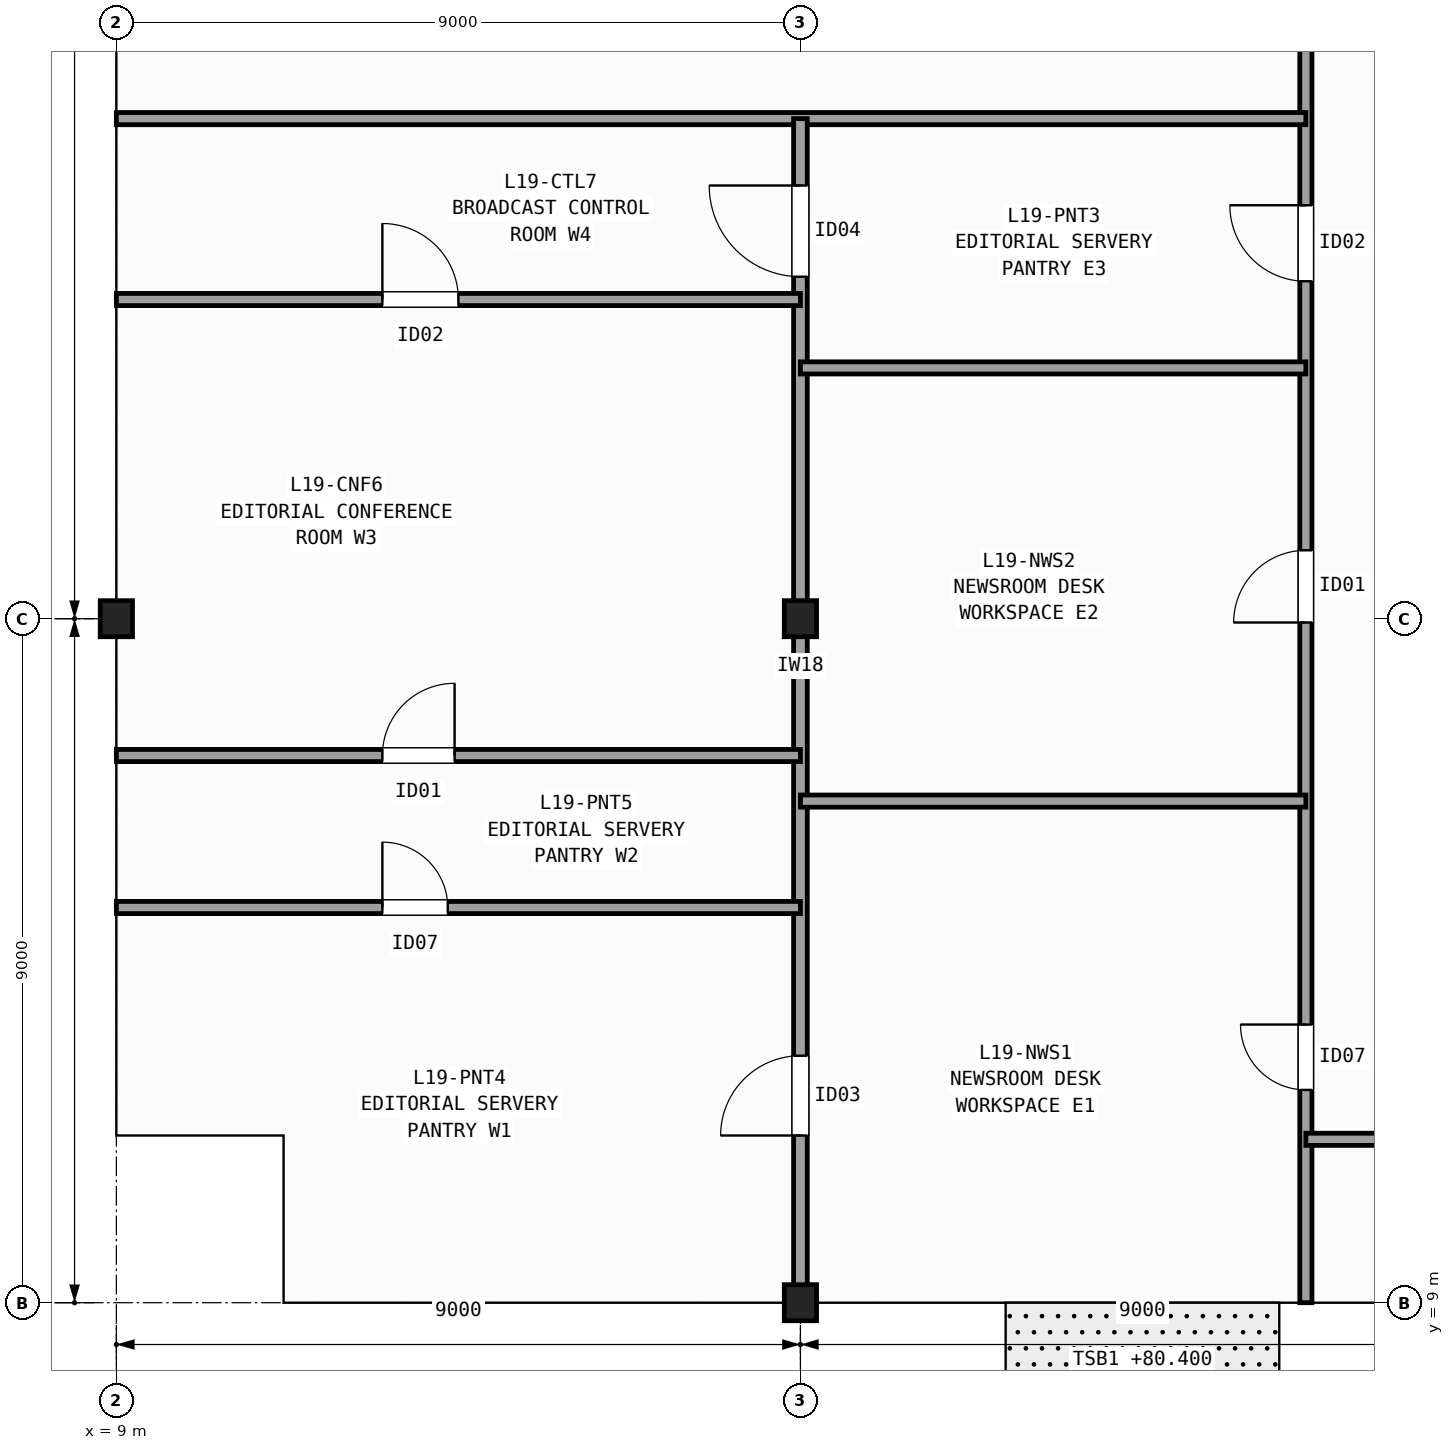
"""IFC4 building model, lengths in metres.
Left out: names, types, materials, properties, quantities, classifications, styles, units other than length and angle.
Written with IfcOpenShell. Run it as: python <this file> out.ifc"""

import sys

from ifc_helpers import new_model, si_unit, direction, frame, frame_2d, origin, origin_2d, place, context, subcontext, project, spatial, rectangle, i_section, extrude, element, fill, save


model = new_model("IFC4")
c1 = context("Model", 3, precision=1e-05, world=origin(), true_north=direction((0.0, 1.0)))
c2 = subcontext(c1, "Body", "Model", "MODEL_VIEW")
j1 = project(units=[si_unit("LENGTHUNIT", "METRE"), si_unit("PLANEANGLEUNIT", "RADIAN")], contexts=[c1])
p1 = place(None, origin())
s1 = spatial("IfcSite", under=j1, at=p1, CompositionType="ELEMENT")
p2 = place(p1, origin())
s2 = spatial("IfcBuilding", under=s1, at=p2, CompositionType="ELEMENT")
p3 = place(p2, frame((0.0, 0.0, 80.4)))
s3 = spatial("IfcBuildingStorey", under=s2, at=p3, CompositionType="ELEMENT", Elevation=80.4)
for number, where, z_axis, x_axis in (
    (1, (9.0, 18.0, 0.0), (0.0, 0.0, 1.0), (1.0, 0.0, 0.0)),
    (2, (18.0, 9.0, 0.0), (0.0, 0.0, 1.0), (1.0, 0.0, 0.0)),
    (3, (18.0, 18.0, 0.0), (0.0, 0.0, 1.0), (1.0, 0.0, 0.0)),
):
    element("IfcColumn", number, at=place(p3, frame(where, z_axis=z_axis, x_axis=x_axis)), inside=s3, PredefinedType="COLUMN", context=c2, shape_type="SweptSolid", body=[
        extrude(i_section(OverallWidth=0.424, OverallDepth=0.474, WebThickness=0.048, FlangeThickness=0.077, FilletRadius=0.015, at=origin_2d()), origin(), (0.0, 0.0, 1.0), 3.7),
    ])
p4 = place(p3, frame((24.65, 9.0, 0.0), z_axis=(0.0, 0.0, 1.0), x_axis=(0.0, 1.0, 0.0)))
e4 = element("IfcWall", 4, at=p4, inside=s3, PredefinedType="PARTITIONING", context=c2, shape_type="SweptSolid", body=[
    extrude(rectangle(XDim=19.2, YDim=0.16, at=frame_2d((9.6, 0.0))), origin(), (0.0, 0.0, 1.0), 2.577),
])
p5 = place(p4, frame((2.8, 0.0, 0.0)))
e5 = element("IfcOpeningElement", 5, at=p5, cuts=e4, PredefinedType="OPENING", context=c2, shape_type="SweptSolid", body=[
    extrude(rectangle(XDim=0.86, YDim=2.05, at=frame_2d((0.43, 1.025))), frame((0.0, 0.09, 0.0), z_axis=(0.0, -1.0, 0.0), x_axis=(1.0, 0.0, 0.0)), (0.0, 0.0, 1.0), 0.18),
])
p6 = place(p4, frame((8.95, 0.0, 0.0)))
e6 = element("IfcOpeningElement", 6, at=p6, cuts=e4, PredefinedType="OPENING", context=c2, shape_type="SweptSolid", body=[
    extrude(rectangle(XDim=0.95, YDim=2.1, at=frame_2d((0.475, 1.05))), frame((0.0, 0.09, 0.0), z_axis=(0.0, -1.0, 0.0), x_axis=(1.0, 0.0, 0.0)), (0.0, 0.0, 1.0), 0.18),
])
p7 = place(p4, frame((13.44, 0.0, 0.0)))
e7 = element("IfcOpeningElement", 7, at=p7, cuts=e4, PredefinedType="OPENING", context=c2, shape_type="SweptSolid", body=[
    extrude(rectangle(XDim=1.0, YDim=2.1, at=frame_2d((0.5, 1.05))), frame((0.0, 0.09, 0.0), z_axis=(0.0, -1.0, 0.0), x_axis=(1.0, 0.0, 0.0)), (0.0, 0.0, 1.0), 0.18),
])
p8 = place(p3, frame((9.0, 24.58, 0.0), z_axis=(0.0, 0.0, 1.0), x_axis=(1.0, 0.0, 0.0)))
e8 = element("IfcWall", 8, at=p8, inside=s3, PredefinedType="PARTITIONING", context=c2, shape_type="SweptSolid", body=[
    extrude(rectangle(XDim=15.65, YDim=0.16, at=frame_2d((7.825, 0.0))), origin(), (0.0, 0.0, 1.0), 2.577),
])
p9 = place(p3, frame((18.0, 9.0, 0.0), z_axis=(0.0, 0.0, 1.0), x_axis=(0.0, 1.0, 0.0)))
e9 = element("IfcWall", 9, at=p9, inside=s3, PredefinedType="PARTITIONING", context=c2, shape_type="SweptSolid", body=[
    extrude(rectangle(XDim=15.58, YDim=0.18, at=frame_2d((7.79, 0.0))), origin(), (0.0, 0.0, 1.0), 2.577),
])
p10 = place(p9, frame((2.2, 0.0, 0.0)))
e10 = element("IfcOpeningElement", 10, at=p10, cuts=e9, PredefinedType="OPENING", context=c2, shape_type="SweptSolid", body=[
    extrude(rectangle(XDim=1.05, YDim=2.15, at=frame_2d((0.525, 1.075))), frame((0.0, 0.1, 0.0), z_axis=(0.0, -1.0, 0.0), x_axis=(1.0, 0.0, 0.0)), (0.0, 0.0, 1.0), 0.2),
])
p11 = place(p9, frame((13.5, 0.0, 0.0)))
e11 = element("IfcOpeningElement", 11, at=p11, cuts=e9, PredefinedType="OPENING", context=c2, shape_type="SweptSolid", body=[
    extrude(rectangle(XDim=1.2, YDim=2.15, at=frame_2d((0.6, 1.075))), frame((0.0, 0.1, 0.0), z_axis=(0.0, -1.0, 0.0), x_axis=(1.0, 0.0, 0.0)), (0.0, 0.0, 1.0), 0.2),
])
for number, where, z_axis, x_axis in (
    (12, (18.0, 15.6, 0.0), (0.0, 0.0, 1.0), (1.0, 0.0, 0.0)),
    (13, (18.0, 21.3, 0.0), (0.0, 0.0, 1.0), (1.0, 0.0, 0.0)),
):
    element("IfcWall", number, at=place(p3, frame(where, z_axis=z_axis, x_axis=x_axis)), inside=s3, PredefinedType="PARTITIONING", context=c2, shape_type="SweptSolid", body=[
        extrude(rectangle(XDim=6.65, YDim=0.16, at=frame_2d((3.325, 0.0))), origin(), (0.0, 0.0, 1.0), 2.742),
    ])
p12 = place(p3, frame((9.0, 14.2, 0.0), z_axis=(0.0, 0.0, 1.0), x_axis=(1.0, 0.0, 0.0)))
e14 = element("IfcWall", 14, at=p12, inside=s3, PredefinedType="PARTITIONING", context=c2, shape_type="SweptSolid", body=[
    extrude(rectangle(XDim=9.0, YDim=0.16, at=frame_2d((4.5, 0.0))), origin(), (0.0, 0.0, 1.0), 2.742),
])
p13 = place(p12, frame((3.5, 0.0, 0.0)))
e15 = element("IfcOpeningElement", 15, at=p13, cuts=e14, PredefinedType="OPENING", context=c2, shape_type="SweptSolid", body=[
    extrude(rectangle(XDim=0.86, YDim=2.05, at=frame_2d((0.43, 1.025))), frame((0.0, 0.09, 0.0), z_axis=(0.0, -1.0, 0.0), x_axis=(1.0, 0.0, 0.0)), (0.0, 0.0, 1.0), 0.18),
])
p14 = place(p3, frame((9.0, 16.2, 0.0), z_axis=(0.0, 0.0, 1.0), x_axis=(1.0, 0.0, 0.0)))
e16 = element("IfcWall", 16, at=p14, inside=s3, PredefinedType="PARTITIONING", context=c2, shape_type="SweptSolid", body=[
    extrude(rectangle(XDim=9.0, YDim=0.16, at=frame_2d((4.5, 0.0))), origin(), (0.0, 0.0, 1.0), 2.742),
])
p15 = place(p14, frame((3.5, 0.0, 0.0)))
e17 = element("IfcOpeningElement", 17, at=p15, cuts=e16, PredefinedType="OPENING", context=c2, shape_type="SweptSolid", body=[
    extrude(rectangle(XDim=0.95, YDim=2.1, at=frame_2d((0.475, 1.05))), frame((0.0, 0.09, 0.0), z_axis=(0.0, -1.0, 0.0), x_axis=(1.0, 0.0, 0.0)), (0.0, 0.0, 1.0), 0.18),
])
p16 = place(p3, frame((9.0, 22.2, 0.0), z_axis=(0.0, 0.0, 1.0), x_axis=(1.0, 0.0, 0.0)))
e18 = element("IfcWall", 18, at=p16, inside=s3, PredefinedType="PARTITIONING", context=c2, shape_type="SweptSolid", body=[
    extrude(rectangle(XDim=9.0, YDim=0.16, at=frame_2d((4.5, 0.0))), origin(), (0.0, 0.0, 1.0), 2.577),
])
p17 = place(p16, frame((3.5, 0.0, 0.0)))
e19 = element("IfcOpeningElement", 19, at=p17, cuts=e18, PredefinedType="OPENING", context=c2, shape_type="SweptSolid", body=[
    extrude(rectangle(XDim=1.0, YDim=2.1, at=frame_2d((0.5, 1.05))), frame((0.0, 0.09, 0.0), z_axis=(0.0, -1.0, 0.0), x_axis=(1.0, 0.0, 0.0)), (0.0, 0.0, 1.0), 0.18),
])
p18 = place(p3, frame((24.65, 11.15, 0.0), z_axis=(0.0, 0.0, 1.0), x_axis=(1.0, 0.0, 0.0)))
e20 = element("IfcWall", 20, at=p18, inside=s3, PredefinedType="PARTITIONING", context=c2, shape_type="SweptSolid", body=[
    extrude(rectangle(XDim=4.75, YDim=0.16, at=frame_2d((2.375, 0.0))), origin(), (0.0, 0.0, 1.0), 2.742),
])
p19 = place(p18, frame((1.2, 0.0, 0.0)))
e21 = element("IfcOpeningElement", 21, at=p19, cuts=e20, PredefinedType="OPENING", context=c2, shape_type="SweptSolid", body=[
    extrude(rectangle(XDim=0.95, YDim=2.1, at=frame_2d((0.475, 1.05))), frame((0.0, 0.09, 0.0), z_axis=(0.0, -1.0, 0.0), x_axis=(1.0, 0.0, 0.0)), (0.0, 0.0, 1.0), 0.18),
])
p20 = place(p5, origin())
e22 = element("IfcDoor", 22, at=p20, inside=s3, OperationType="SINGLE_SWING_RIGHT", PredefinedType="DOOR", context=c2, shape_type="SweptSolid", body=[
    extrude(rectangle(XDim=0.86, YDim=2.05, at=frame_2d((0.43, 1.025))), frame((0.0, 0.025, 0.0), z_axis=(0.0, -1.0, 0.0), x_axis=(1.0, 0.0, 0.0)), (0.0, 0.0, 1.0), 0.05),
])
fill(e5, e22)
p21 = place(p6, origin())
e23 = element("IfcDoor", 23, at=p21, inside=s3, OperationType="SINGLE_SWING_LEFT", PredefinedType="DOOR", context=c2, shape_type="SweptSolid", body=[
    extrude(rectangle(XDim=0.95, YDim=2.1, at=frame_2d((0.475, 1.05))), frame((0.0, 0.025, 0.0), z_axis=(0.0, -1.0, 0.0), x_axis=(1.0, 0.0, 0.0)), (0.0, 0.0, 1.0), 0.05),
])
fill(e6, e23)
p22 = place(p7, origin())
e24 = element("IfcDoor", 24, at=p22, inside=s3, OperationType="SINGLE_SWING_RIGHT", PredefinedType="DOOR", context=c2, shape_type="SweptSolid", body=[
    extrude(rectangle(XDim=1.0, YDim=2.1, at=frame_2d((0.5, 1.05))), frame((0.0, 0.025, 0.0), z_axis=(0.0, -1.0, 0.0), x_axis=(1.0, 0.0, 0.0)), (0.0, 0.0, 1.0), 0.05),
])
fill(e7, e24)
p23 = place(p10, origin())
e25 = element("IfcDoor", 25, at=p23, inside=s3, OperationType="SINGLE_SWING_LEFT", PredefinedType="DOOR", context=c2, shape_type="SweptSolid", body=[
    extrude(rectangle(XDim=1.05, YDim=2.15, at=frame_2d((0.525, 1.075))), frame((0.0, 0.025, 0.0), z_axis=(0.0, -1.0, 0.0), x_axis=(1.0, 0.0, 0.0)), (0.0, 0.0, 1.0), 0.05),
])
fill(e10, e25)
p24 = place(p11, origin())
e26 = element("IfcDoor", 26, at=p24, inside=s3, OperationType="SINGLE_SWING_RIGHT", PredefinedType="DOOR", context=c2, shape_type="SweptSolid", body=[
    extrude(rectangle(XDim=1.2, YDim=2.15, at=frame_2d((0.6, 1.075))), frame((0.0, 0.025, 0.0), z_axis=(0.0, -1.0, 0.0), x_axis=(1.0, 0.0, 0.0)), (0.0, 0.0, 1.0), 0.05),
])
fill(e11, e26)
p25 = place(p13, origin())
e27 = element("IfcDoor", 27, at=p25, inside=s3, OperationType="SINGLE_SWING_LEFT", PredefinedType="DOOR", context=c2, shape_type="SweptSolid", body=[
    extrude(rectangle(XDim=0.86, YDim=2.05, at=frame_2d((0.43, 1.025))), frame((0.0, 0.025, 0.0), z_axis=(0.0, -1.0, 0.0), x_axis=(1.0, 0.0, 0.0)), (0.0, 0.0, 1.0), 0.05),
])
fill(e15, e27)
p26 = place(p15, origin())
e28 = element("IfcDoor", 28, at=p26, inside=s3, OperationType="SINGLE_SWING_RIGHT", PredefinedType="DOOR", context=c2, shape_type="SweptSolid", body=[
    extrude(rectangle(XDim=0.95, YDim=2.1, at=frame_2d((0.475, 1.05))), frame((0.0, 0.025, 0.0), z_axis=(0.0, -1.0, 0.0), x_axis=(1.0, 0.0, 0.0)), (0.0, 0.0, 1.0), 0.05),
])
fill(e17, e28)
p27 = place(p17, origin())
e29 = element("IfcDoor", 29, at=p27, inside=s3, OperationType="SINGLE_SWING_LEFT", PredefinedType="DOOR", context=c2, shape_type="SweptSolid", body=[
    extrude(rectangle(XDim=1.0, YDim=2.1, at=frame_2d((0.5, 1.05))), frame((0.0, 0.025, 0.0), z_axis=(0.0, -1.0, 0.0), x_axis=(1.0, 0.0, 0.0)), (0.0, 0.0, 1.0), 0.05),
])
fill(e19, e29)
save(model, sys.argv[1])
